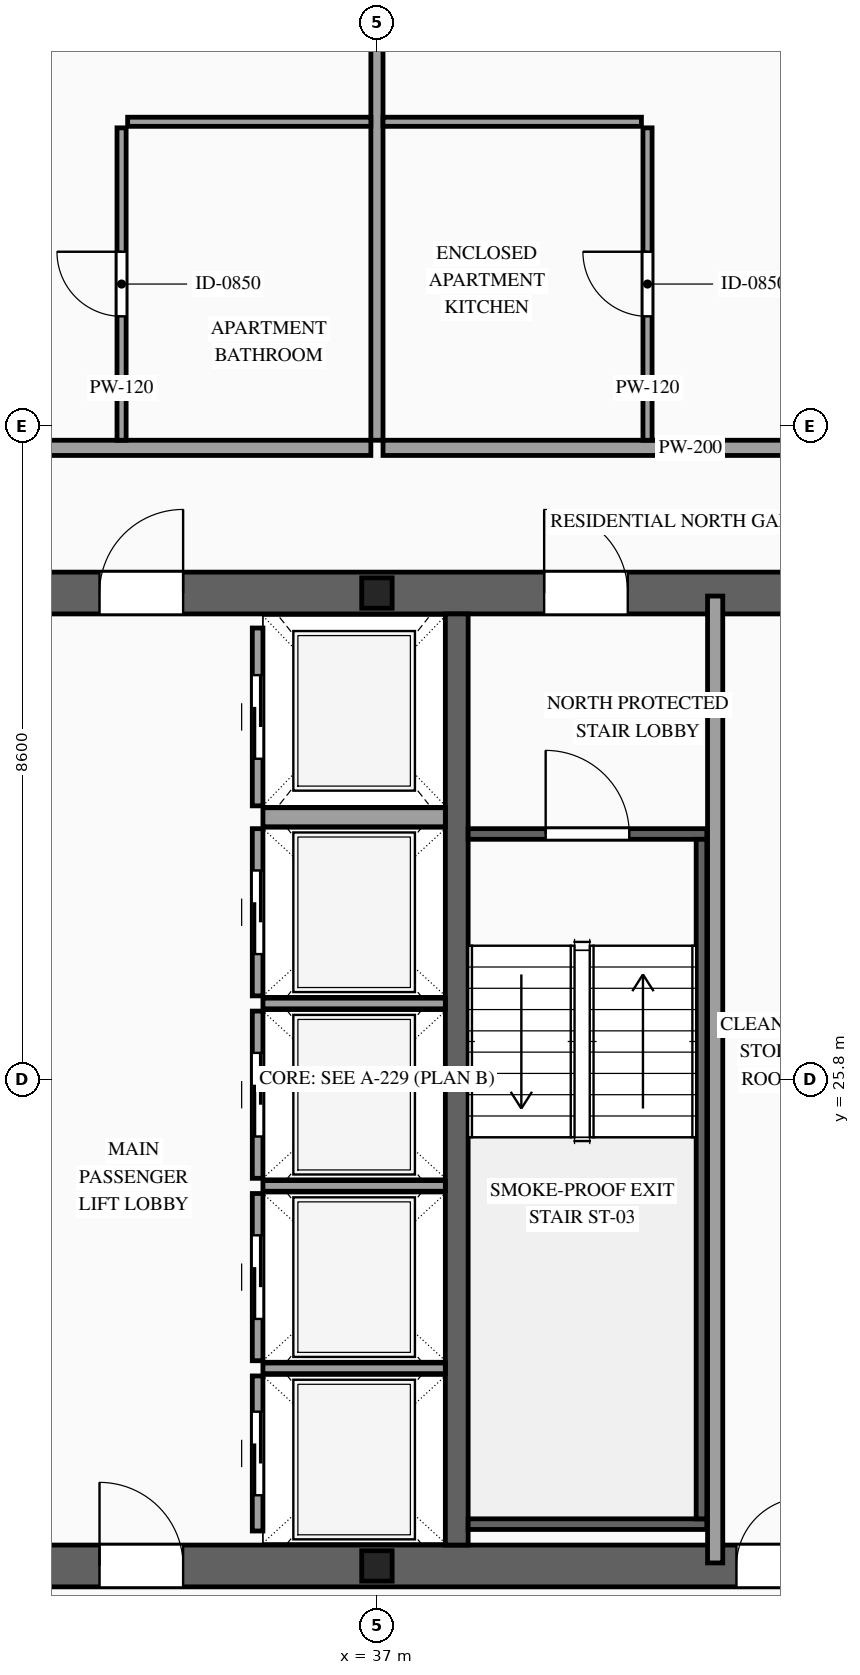
"""IFC4 building model, lengths in metres.
Left out: names, types, materials, properties, quantities, classifications, styles, units other than length and angle.
Written with IfcOpenShell. Run it as: python <this file> out.ifc"""

import sys

from ifc_helpers import new_model, si_unit, direction, frame, frame_2d, origin, origin_2d, place, context, subcontext, project, spatial, rectangle, i_section, extrude, source, transform, mapped, element, fill, save


model = new_model("IFC4")
c1 = context("Model", 3, precision=1e-05, world=origin(), true_north=direction((0.0, 1.0)))
c2 = subcontext(c1, "Body", "Model", "MODEL_VIEW")
j1 = project(units=[si_unit("LENGTHUNIT", "METRE"), si_unit("PLANEANGLEUNIT", "RADIAN")], contexts=[c1])
p1 = place(None, origin())
s1 = spatial("IfcSite", under=j1, at=p1, CompositionType="ELEMENT")
p2 = place(p1, origin())
s2 = spatial("IfcBuilding", under=s1, at=p2, CompositionType="ELEMENT")
p3 = place(p2, frame((0.0, 0.0, 224.1)))
s3 = spatial("IfcBuildingStorey", under=s2, at=p3, CompositionType="ELEMENT", Elevation=224.1)
p4 = place(p3, frame((23.525, 19.4, 0.0), z_axis=(0.0, 0.0, 1.0), x_axis=(1.0, 0.0, 0.0)))
e1 = element("IfcWall", 1, at=p4, inside=s3, PredefinedType="SHEAR", context=c2, shape_type="SweptSolid", body=[
    extrude(rectangle(XDim=26.95, YDim=0.55, at=frame_2d((13.475, 0.0))), origin(), (0.0, 0.0, 1.0), 3.5),
])
p5 = place(p4, frame((1.925, 0.0, 0.0)))
e2 = element("IfcOpeningElement", 2, at=p5, cuts=e1, PredefinedType="OPENING", context=c2, shape_type="SweptSolid", body=[
    extrude(rectangle(XDim=1.1, YDim=2.2, at=frame_2d((0.55, 1.1))), frame((0.0, 0.29, 0.0), z_axis=(0.0, -1.0, 0.0), x_axis=(1.0, 0.0, 0.0)), (0.0, 0.0, 1.0), 0.58),
])
p6 = place(p4, frame((9.825, 0.0, 0.0)))
e3 = element("IfcOpeningElement", 3, at=p6, cuts=e1, PredefinedType="OPENING", context=c2, shape_type="SweptSolid", body=[
    extrude(rectangle(XDim=1.1, YDim=2.2, at=frame_2d((0.55, 1.1))), frame((0.0, 0.29, 0.0), z_axis=(0.0, -1.0, 0.0), x_axis=(1.0, 0.0, 0.0)), (0.0, 0.0, 1.0), 0.58),
])
p7 = place(p4, frame((23.025, 0.0, 0.0)))
e4 = element("IfcOpeningElement", 4, at=p7, cuts=e1, PredefinedType="OPENING", context=c2, shape_type="SweptSolid", body=[
    extrude(rectangle(XDim=1.1, YDim=2.2, at=frame_2d((0.55, 1.1))), frame((0.0, 0.29, 0.0), z_axis=(0.0, -1.0, 0.0), x_axis=(1.0, 0.0, 0.0)), (0.0, 0.0, 1.0), 0.58),
])
p8 = place(p4, frame((19.645, 0.0, 0.0)))
e5 = element("IfcOpeningElement", 5, at=p8, cuts=e1, PredefinedType="OPENING", context=c2, shape_type="SweptSolid", body=[
    extrude(rectangle(XDim=0.9, YDim=2.15, at=frame_2d((0.45, 1.075))), frame((0.0, 0.29, 0.0), z_axis=(0.0, -1.0, 0.0), x_axis=(1.0, 0.0, 0.0)), (0.0, 0.0, 1.0), 0.58),
])
p9 = place(p4, frame((18.205, 0.0, 0.0)))
e6 = element("IfcOpeningElement", 6, at=p9, cuts=e1, PredefinedType="OPENING", context=c2, shape_type="SweptSolid", body=[
    extrude(rectangle(XDim=0.9, YDim=2.15, at=frame_2d((0.45, 1.075))), frame((0.0, 0.29, 0.0), z_axis=(0.0, -1.0, 0.0), x_axis=(1.0, 0.0, 0.0)), (0.0, 0.0, 1.0), 0.58),
])
p10 = place(p3, frame((23.525, 32.2, 0.0), z_axis=(0.0, 0.0, 1.0), x_axis=(1.0, 0.0, 0.0)))
e7 = element("IfcWall", 7, at=p10, inside=s3, PredefinedType="SHEAR", context=c2, shape_type="SweptSolid", body=[
    extrude(rectangle(XDim=26.95, YDim=0.55, at=frame_2d((13.475, 0.0))), origin(), (0.0, 0.0, 1.0), 3.5),
])
p11 = place(p10, frame((4.545, 0.0, 0.0)))
e8 = element("IfcOpeningElement", 8, at=p11, cuts=e7, PredefinedType="OPENING", context=c2, shape_type="SweptSolid", body=[
    extrude(rectangle(XDim=0.9, YDim=2.15, at=frame_2d((0.45, 1.075))), frame((0.0, 0.29, 0.0), z_axis=(0.0, -1.0, 0.0), x_axis=(1.0, 0.0, 0.0)), (0.0, 0.0, 1.0), 0.58),
])
p12 = place(p10, frame((9.825, 0.0, 0.0)))
e9 = element("IfcOpeningElement", 9, at=p12, cuts=e7, PredefinedType="OPENING", context=c2, shape_type="SweptSolid", body=[
    extrude(rectangle(XDim=1.1, YDim=2.2, at=frame_2d((0.55, 1.1))), frame((0.0, 0.29, 0.0), z_axis=(0.0, -1.0, 0.0), x_axis=(1.0, 0.0, 0.0)), (0.0, 0.0, 1.0), 0.58),
])
p13 = place(p10, frame((15.675, 0.0, 0.0)))
e10 = element("IfcOpeningElement", 10, at=p13, cuts=e7, PredefinedType="OPENING", context=c2, shape_type="SweptSolid", body=[
    extrude(rectangle(XDim=1.1, YDim=2.2, at=frame_2d((0.55, 1.1))), frame((0.0, 0.29, 0.0), z_axis=(0.0, -1.0, 0.0), x_axis=(1.0, 0.0, 0.0)), (0.0, 0.0, 1.0), 0.58),
])
p14 = place(p10, frame((19.645, 0.0, 0.0)))
e11 = element("IfcOpeningElement", 11, at=p14, cuts=e7, PredefinedType="OPENING", context=c2, shape_type="SweptSolid", body=[
    extrude(rectangle(XDim=0.9, YDim=2.15, at=frame_2d((0.45, 1.075))), frame((0.0, 0.29, 0.0), z_axis=(0.0, -1.0, 0.0), x_axis=(1.0, 0.0, 0.0)), (0.0, 0.0, 1.0), 0.58),
])
m1 = source(origin(), c2, "Body", "SweptSolid", [
    extrude(rectangle(XDim=12.25, YDim=0.3, at=frame_2d((6.125, 0.0))), origin(), (0.0, 0.0, 1.0), 3.5),
])
p15 = place(p3, frame((38.05, 19.675, 0.0), z_axis=(0.0, 0.0, 1.0), x_axis=(0.0, 1.0, 0.0)))
e12 = element("IfcWall", 12, at=p15, inside=s3, PredefinedType="SOLIDWALL", context=c2, shape_type="MappedRepresentation", body=[
    mapped(m1, transform((0.0, 0.0, 0.0), scale=1.0)),
])
m2 = source(origin(), c2, "Body", "SweptSolid", [
    extrude(i_section(OverallWidth=0.4, OverallDepth=0.4, WebThickness=0.013, FlangeThickness=0.021, at=origin_2d()), origin(), (0.0, 0.0, 1.0), 3.5),
])
for number, where, z_axis, x_axis in (
    (13, (37.0, 19.4, 0.0), (0.0, 0.0, 1.0), (1.0, 0.0, 0.0)),
    (14, (37.0, 32.2, 0.0), (0.0, 0.0, 1.0), (1.0, 0.0, 0.0)),
):
    element("IfcColumn", number, at=place(p3, frame(where, z_axis=z_axis, x_axis=x_axis)), inside=s3, PredefinedType="COLUMN", context=c2, shape_type="MappedRepresentation", body=[
        mapped(m2, transform((0.0, 0.0, 0.0), scale=1.0)),
    ])
p16 = place(p3, frame((35.43, 19.86, 0.0), z_axis=(0.0, 0.0, 1.0), x_axis=(0.0, 1.0, 0.0)))
e15 = element("IfcWall", 15, at=p16, inside=s3, PredefinedType="SOLIDWALL", context=c2, shape_type="SweptSolid", body=[
    extrude(rectangle(XDim=2.04, YDim=0.14, at=frame_2d((1.02, 0.0))), origin(), (0.0, 0.0, 1.0), 3.28),
])
p17 = place(p16, frame((0.47, 0.0, 0.0)))
e16 = element("IfcOpeningElement", 16, at=p17, cuts=e15, PredefinedType="OPENING", context=c2, shape_type="SweptSolid", body=[
    extrude(rectangle(XDim=1.1, YDim=2.2, at=frame_2d((0.55, 1.1))), frame((0.0, 0.085, 0.0), z_axis=(0.0, -1.0, 0.0), x_axis=(1.0, 0.0, 0.0)), (0.0, 0.0, 1.0), 0.17),
])
m3 = source(origin(), c2, "Body", "SweptSolid", [
    extrude(rectangle(XDim=2.4, YDim=0.14, at=frame_2d((1.2, 0.0))), origin(), (0.0, 0.0, 1.0), 3.28),
])
p18 = place(p3, frame((35.5, 22.0, 0.0), z_axis=(0.0, 0.0, 1.0), x_axis=(1.0, 0.0, 0.0)))
e17 = element("IfcWall", 17, at=p18, inside=s3, PredefinedType="SOLIDWALL", context=c2, shape_type="MappedRepresentation", body=[
    mapped(m3, transform((0.0, 0.0, 0.0), scale=1.0)),
])
p19 = place(p3, frame((35.43, 22.1, 0.0), z_axis=(0.0, 0.0, 1.0), x_axis=(0.0, 1.0, 0.0)))
e18 = element("IfcWall", 18, at=p19, inside=s3, PredefinedType="SOLIDWALL", context=c2, shape_type="SweptSolid", body=[
    extrude(rectangle(XDim=2.2, YDim=0.14, at=frame_2d((1.1, 0.0))), origin(), (0.0, 0.0, 1.0), 3.28),
])
p20 = place(p19, frame((0.55, 0.0, 0.0)))
e19 = element("IfcOpeningElement", 19, at=p20, cuts=e18, PredefinedType="OPENING", context=c2, shape_type="SweptSolid", body=[
    extrude(rectangle(XDim=1.1, YDim=2.2, at=frame_2d((0.55, 1.1))), frame((0.0, 0.085, 0.0), z_axis=(0.0, -1.0, 0.0), x_axis=(1.0, 0.0, 0.0)), (0.0, 0.0, 1.0), 0.17),
])
p21 = place(p3, frame((35.5, 24.4, 0.0), z_axis=(0.0, 0.0, 1.0), x_axis=(1.0, 0.0, 0.0)))
e20 = element("IfcWall", 20, at=p21, inside=s3, PredefinedType="SOLIDWALL", context=c2, shape_type="MappedRepresentation", body=[
    mapped(m3, transform((0.0, 0.0, 0.0), scale=1.0)),
])
p22 = place(p3, frame((35.43, 24.5, 0.0), z_axis=(0.0, 0.0, 1.0), x_axis=(0.0, 1.0, 0.0)))
e21 = element("IfcWall", 21, at=p22, inside=s3, PredefinedType="SOLIDWALL", context=c2, shape_type="SweptSolid", body=[
    extrude(rectangle(XDim=2.2, YDim=0.14, at=frame_2d((1.1, 0.0))), origin(), (0.0, 0.0, 1.0), 3.28),
])
p23 = place(p22, frame((0.55, 0.0, 0.0)))
e22 = element("IfcOpeningElement", 22, at=p23, cuts=e21, PredefinedType="OPENING", context=c2, shape_type="SweptSolid", body=[
    extrude(rectangle(XDim=1.1, YDim=2.2, at=frame_2d((0.55, 1.1))), frame((0.0, 0.085, 0.0), z_axis=(0.0, -1.0, 0.0), x_axis=(1.0, 0.0, 0.0)), (0.0, 0.0, 1.0), 0.17),
])
p24 = place(p3, frame((35.5, 26.8, 0.0), z_axis=(0.0, 0.0, 1.0), x_axis=(1.0, 0.0, 0.0)))
e23 = element("IfcWall", 23, at=p24, inside=s3, PredefinedType="SOLIDWALL", context=c2, shape_type="MappedRepresentation", body=[
    mapped(m3, transform((0.0, 0.0, 0.0), scale=1.0)),
])
p25 = place(p3, frame((35.43, 26.9, 0.0), z_axis=(0.0, 0.0, 1.0), x_axis=(0.0, 1.0, 0.0)))
e24 = element("IfcWall", 24, at=p25, inside=s3, PredefinedType="SOLIDWALL", context=c2, shape_type="SweptSolid", body=[
    extrude(rectangle(XDim=2.2, YDim=0.14, at=frame_2d((1.1, 0.0))), origin(), (0.0, 0.0, 1.0), 3.28),
])
p26 = place(p25, frame((0.55, 0.0, 0.0)))
e25 = element("IfcOpeningElement", 25, at=p26, cuts=e24, PredefinedType="OPENING", context=c2, shape_type="SweptSolid", body=[
    extrude(rectangle(XDim=1.1, YDim=2.2, at=frame_2d((0.55, 1.1))), frame((0.0, 0.085, 0.0), z_axis=(0.0, -1.0, 0.0), x_axis=(1.0, 0.0, 0.0)), (0.0, 0.0, 1.0), 0.17),
])
p27 = place(p3, frame((35.43, 29.4, 0.0), z_axis=(0.0, 0.0, 1.0), x_axis=(0.0, 1.0, 0.0)))
e26 = element("IfcWall", 26, at=p27, inside=s3, PredefinedType="SOLIDWALL", context=c2, shape_type="SweptSolid", body=[
    extrude(rectangle(XDim=2.34, YDim=0.14, at=frame_2d((1.17, 0.0))), origin(), (0.0, 0.0, 1.0), 3.28),
])
p28 = place(p27, frame((0.62, 0.0, 0.0)))
e27 = element("IfcOpeningElement", 27, at=p28, cuts=e26, PredefinedType="OPENING", context=c2, shape_type="SweptSolid", body=[
    extrude(rectangle(XDim=1.1, YDim=2.2, at=frame_2d((0.55, 1.1))), frame((0.0, 0.085, 0.0), z_axis=(0.0, -1.0, 0.0), x_axis=(1.0, 0.0, 0.0)), (0.0, 0.0, 1.0), 0.17),
])
m4 = source(origin(), c2, "Body", "SweptSolid", [
    extrude(rectangle(XDim=2.4, YDim=0.25, at=frame_2d((1.2, 0.0))), origin(), (0.0, 0.0, 1.0), 3.28),
])
p29 = place(p3, frame((35.5, 29.25, 0.0), z_axis=(0.0, 0.0, 1.0), x_axis=(1.0, 0.0, 0.0)))
e28 = element("IfcWall", 28, at=p29, inside=s3, PredefinedType="SOLIDWALL", context=c2, shape_type="MappedRepresentation", body=[
    mapped(m4, transform((0.0, 0.0, 0.0), scale=1.0)),
])
p30 = place(p3, frame((38.2, 29.03, 0.0), z_axis=(0.0, 0.0, 1.0), x_axis=(1.0, 0.0, 0.0)))
e29 = element("IfcWall", 29, at=p30, inside=s3, PredefinedType="SOLIDWALL", context=c2, shape_type="SweptSolid", body=[
    extrude(rectangle(XDim=3.14, YDim=0.14, at=frame_2d((1.57, 0.0))), origin(), (0.0, 0.0, 1.0), 3.28),
])
p31 = place(p30, frame((1.02, 0.0, 0.0)))
e30 = element("IfcOpeningElement", 30, at=p31, cuts=e29, PredefinedType="OPENING", context=c2, shape_type="SweptSolid", body=[
    extrude(rectangle(XDim=1.1, YDim=2.2, at=frame_2d((0.55, 1.1))), frame((0.0, 0.085, 0.0), z_axis=(0.0, -1.0, 0.0), x_axis=(1.0, 0.0, 0.0)), (0.0, 0.0, 1.0), 0.17),
])
m5 = source(origin(), c2, "Body", "SweptSolid", [
    extrude(rectangle(XDim=3.14, YDim=0.14, at=frame_2d((1.57, 0.0))), origin(), (0.0, 0.0, 1.0), 3.28),
])
p32 = place(p3, frame((38.2, 19.95, 0.0), z_axis=(0.0, 0.0, 1.0), x_axis=(1.0, 0.0, 0.0)))
e31 = element("IfcWall", 31, at=p32, inside=s3, PredefinedType="SOLIDWALL", context=c2, shape_type="MappedRepresentation", body=[
    mapped(m5, transform((0.0, 0.0, 0.0), scale=1.0)),
])
m6 = source(origin(), c2, "Body", "SweptSolid", [
    extrude(rectangle(XDim=8.94, YDim=0.14, at=frame_2d((4.47, 0.0))), origin(), (0.0, 0.0, 1.0), 3.28),
])
p33 = place(p3, frame((41.27, 20.02, 0.0), z_axis=(0.0, 0.0, 1.0), x_axis=(0.0, 1.0, 0.0)))
e32 = element("IfcWall", 32, at=p33, inside=s3, PredefinedType="SOLIDWALL", context=c2, shape_type="MappedRepresentation", body=[
    mapped(m6, transform((0.0, 0.0, 0.0), scale=1.0)),
])
m7 = source(origin(), c2, "Body", "SweptSolid", [
    extrude(rectangle(XDim=12.72, YDim=0.2, at=frame_2d((6.36, 0.0))), origin(), (0.0, 0.0, 1.0), 3.28),
])
p34 = place(p3, frame((41.45, 19.44, 0.0), z_axis=(0.0, 0.0, 1.0), x_axis=(0.0, 1.0, 0.0)))
e33 = element("IfcWall", 33, at=p34, inside=s3, PredefinedType="PARTITIONING", context=c2, shape_type="MappedRepresentation", body=[
    mapped(m7, transform((0.0, 0.0, 0.0), scale=1.0)),
])
p35 = place(p3, frame((19.44, 34.11, 0.0), z_axis=(0.0, 0.0, 1.0), x_axis=(1.0, 0.0, 0.0)))
e34 = element("IfcWall", 34, at=p35, inside=s3, PredefinedType="PARTITIONING", context=c2, shape_type="SweptSolid", body=[
    extrude(rectangle(XDim=17.48, YDim=0.2, at=frame_2d((8.74, 0.0))), origin(), (0.0, 0.0, 1.0), 3.28),
])
p36 = place(p35, frame((8.34, 0.0, 0.0)))
e35 = element("IfcOpeningElement", 35, at=p36, cuts=e34, PredefinedType="OPENING", context=c2, shape_type="SweptSolid", body=[
    extrude(rectangle(XDim=1.0, YDim=2.2, at=frame_2d((0.5, 1.1))), frame((0.0, 0.115, 0.0), z_axis=(0.0, -1.0, 0.0), x_axis=(1.0, 0.0, 0.0)), (0.0, 0.0, 1.0), 0.23),
])
m8 = source(origin(), c2, "Body", "SweptSolid", [
    extrude(rectangle(XDim=12.04, YDim=0.16, at=frame_2d((6.02, 0.0))), origin(), (0.0, 0.0, 1.0), 2.787),
])
p37 = place(p3, frame((37.0, 34.21, 0.0), z_axis=(0.0, 0.0, 1.0), x_axis=(0.0, 1.0, 0.0)))
e36 = element("IfcWall", 36, at=p37, inside=s3, PredefinedType="PARTITIONING", context=c2, shape_type="MappedRepresentation", body=[
    mapped(m8, transform((0.0, 0.0, 0.0), scale=1.0)),
])
m9 = source(origin(), c2, "Body", "SweptSolid", [
    extrude(rectangle(XDim=3.2, YDim=0.12, at=frame_2d((1.6, 0.0))), origin(), (0.0, 0.0, 1.0), 3.28),
])
p38 = place(p3, frame((33.72, 38.4, 0.0), z_axis=(0.0, 0.0, 1.0), x_axis=(1.0, 0.0, 0.0)))
e37 = element("IfcWall", 37, at=p38, inside=s3, PredefinedType="PARTITIONING", context=c2, shape_type="MappedRepresentation", body=[
    mapped(m9, transform((0.0, 0.0, 0.0), scale=1.0)),
])
p39 = place(p3, frame((33.64, 34.21, 0.0), z_axis=(0.0, 0.0, 1.0), x_axis=(0.0, 1.0, 0.0)))
e38 = element("IfcWall", 38, at=p39, inside=s3, PredefinedType="PARTITIONING", context=c2, shape_type="SweptSolid", body=[
    extrude(rectangle(XDim=4.11, YDim=0.12, at=frame_2d((2.055, 0.0))), origin(), (0.0, 0.0, 1.0), 3.28),
])
p40 = place(p39, frame((1.63, 0.0, 0.0)))
e39 = element("IfcOpeningElement", 39, at=p40, cuts=e38, PredefinedType="OPENING", context=c2, shape_type="SweptSolid", body=[
    extrude(rectangle(XDim=0.85, YDim=2.1, at=frame_2d((0.425, 1.05))), frame((0.0, 0.075, 0.0), z_axis=(0.0, -1.0, 0.0), x_axis=(1.0, 0.0, 0.0)), (0.0, 0.0, 1.0), 0.15),
])
p41 = place(p3, frame((37.08, 34.11, 0.0), z_axis=(0.0, 0.0, 1.0), x_axis=(1.0, 0.0, 0.0)))
e40 = element("IfcWall", 40, at=p41, inside=s3, PredefinedType="PARTITIONING", context=c2, shape_type="SweptSolid", body=[
    extrude(rectangle(XDim=17.48, YDim=0.2, at=frame_2d((8.74, 0.0))), origin(), (0.0, 0.0, 1.0), 3.28),
])
p42 = place(p41, frame((8.34, 0.0, 0.0)))
e41 = element("IfcOpeningElement", 41, at=p42, cuts=e40, PredefinedType="OPENING", context=c2, shape_type="SweptSolid", body=[
    extrude(rectangle(XDim=1.0, YDim=2.2, at=frame_2d((0.5, 1.1))), frame((0.0, 0.115, 0.0), z_axis=(0.0, -1.0, 0.0), x_axis=(1.0, 0.0, 0.0)), (0.0, 0.0, 1.0), 0.23),
])
m10 = source(origin(), c2, "Body", "SweptSolid", [
    extrude(rectangle(XDim=3.4, YDim=0.12, at=frame_2d((1.7, 0.0))), origin(), (0.0, 0.0, 1.0), 3.28),
])
p43 = place(p3, frame((37.08, 38.4, 0.0), z_axis=(0.0, 0.0, 1.0), x_axis=(1.0, 0.0, 0.0)))
e42 = element("IfcWall", 42, at=p43, inside=s3, PredefinedType="PARTITIONING", context=c2, shape_type="MappedRepresentation", body=[
    mapped(m10, transform((0.0, 0.0, 0.0), scale=1.0)),
])
p44 = place(p3, frame((40.56, 34.21, 0.0), z_axis=(0.0, 0.0, 1.0), x_axis=(0.0, 1.0, 0.0)))
e43 = element("IfcWall", 43, at=p44, inside=s3, PredefinedType="PARTITIONING", context=c2, shape_type="SweptSolid", body=[
    extrude(rectangle(XDim=4.11, YDim=0.12, at=frame_2d((2.055, 0.0))), origin(), (0.0, 0.0, 1.0), 3.28),
])
p45 = place(p44, frame((1.63, 0.0, 0.0)))
e44 = element("IfcOpeningElement", 44, at=p45, cuts=e43, PredefinedType="OPENING", context=c2, shape_type="SweptSolid", body=[
    extrude(rectangle(XDim=0.85, YDim=2.1, at=frame_2d((0.425, 1.05))), frame((0.0, 0.075, 0.0), z_axis=(0.0, -1.0, 0.0), x_axis=(1.0, 0.0, 0.0)), (0.0, 0.0, 1.0), 0.15),
])
m11 = source(origin(), c2, "Body", "SweptSolid", [
    extrude(rectangle(XDim=1.1, YDim=2.2, at=frame_2d((0.55, 1.1))), frame((0.0, 0.025, 0.0), z_axis=(0.0, -1.0, 0.0), x_axis=(1.0, 0.0, 0.0)), (0.0, 0.0, 1.0), 0.05),
])
p46 = place(p17, origin())
e45 = element("IfcDoor", 45, at=p46, inside=s3, OperationType="SLIDING_TO_RIGHT", PredefinedType="DOOR", context=c2, shape_type="MappedRepresentation", body=[
    mapped(m11, transform((0.0, 0.0, 0.0), scale=1.0)),
])
fill(e16, e45)
p47 = place(p20, origin())
e46 = element("IfcDoor", 46, at=p47, inside=s3, OperationType="SLIDING_TO_LEFT", PredefinedType="DOOR", context=c2, shape_type="MappedRepresentation", body=[
    mapped(m11, transform((0.0, 0.0, 0.0), scale=1.0)),
])
fill(e19, e46)
p48 = place(p23, origin())
e47 = element("IfcDoor", 47, at=p48, inside=s3, OperationType="SLIDING_TO_RIGHT", PredefinedType="DOOR", context=c2, shape_type="MappedRepresentation", body=[
    mapped(m11, transform((0.0, 0.0, 0.0), scale=1.0)),
])
fill(e22, e47)
p49 = place(p26, origin())
e48 = element("IfcDoor", 48, at=p49, inside=s3, OperationType="SLIDING_TO_LEFT", PredefinedType="DOOR", context=c2, shape_type="MappedRepresentation", body=[
    mapped(m11, transform((0.0, 0.0, 0.0), scale=1.0)),
])
fill(e25, e48)
p50 = place(p28, origin())
e49 = element("IfcDoor", 49, at=p50, inside=s3, OperationType="SLIDING_TO_RIGHT", PredefinedType="DOOR", context=c2, shape_type="MappedRepresentation", body=[
    mapped(m11, transform((0.0, 0.0, 0.0), scale=1.0)),
])
fill(e27, e49)
m12 = source(origin(), c2, "Body", "SweptSolid", [
    extrude(rectangle(XDim=1.1, YDim=2.2, at=frame_2d((0.55, 1.1))), frame((0.0, 0.025, 0.0), z_axis=(0.0, -1.0, 0.0), x_axis=(1.0, 0.0, 0.0)), (0.0, 0.0, 1.0), 0.05),
])
p51 = place(p31, origin())
e50 = element("IfcDoor", 50, at=p51, inside=s3, OperationType="SINGLE_SWING_LEFT", PredefinedType="DOOR", context=c2, shape_type="MappedRepresentation", body=[
    mapped(m12, transform((0.0, 0.0, 0.0), scale=1.0)),
])
fill(e30, e50)
p52 = place(p6, origin())
e51 = element("IfcDoor", 51, at=p52, inside=s3, OperationType="SINGLE_SWING_LEFT", PredefinedType="DOOR", context=c2, shape_type="MappedRepresentation", body=[
    mapped(m12, transform((0.0, 0.0, 0.0), scale=1.0)),
])
fill(e3, e51)
p53 = place(p12, origin())
e52 = element("IfcDoor", 52, at=p53, inside=s3, OperationType="SINGLE_SWING_RIGHT", PredefinedType="DOOR", context=c2, shape_type="MappedRepresentation", body=[
    mapped(m12, transform((0.0, 0.0, 0.0), scale=1.0)),
])
fill(e9, e52)
p54 = place(p13, origin())
e53 = element("IfcDoor", 53, at=p54, inside=s3, OperationType="SINGLE_SWING_LEFT", PredefinedType="DOOR", context=c2, shape_type="MappedRepresentation", body=[
    mapped(m12, transform((0.0, 0.0, 0.0), scale=1.0)),
])
fill(e10, e53)
m13 = source(origin(), c2, "Body", "SweptSolid", [
    extrude(rectangle(XDim=0.9, YDim=2.15, at=frame_2d((0.45, 1.075))), frame((0.0, 0.025, 0.0), z_axis=(0.0, -1.0, 0.0), x_axis=(1.0, 0.0, 0.0)), (0.0, 0.0, 1.0), 0.05),
])
p55 = place(p9, origin())
e54 = element("IfcDoor", 54, at=p55, inside=s3, OperationType="SINGLE_SWING_RIGHT", PredefinedType="DOOR", context=c2, shape_type="MappedRepresentation", body=[
    mapped(m13, transform((0.0, 0.0, 0.0), scale=1.0)),
])
fill(e6, e54)
m14 = source(origin(), c2, "Body", "SweptSolid", [
    extrude(rectangle(XDim=0.85, YDim=2.1, at=frame_2d((0.425, 1.05))), frame((0.0, 0.025, 0.0), z_axis=(0.0, -1.0, 0.0), x_axis=(1.0, 0.0, 0.0)), (0.0, 0.0, 1.0), 0.05),
])
p56 = place(p40, origin())
e55 = element("IfcDoor", 55, at=p56, inside=s3, OperationType="SINGLE_SWING_RIGHT", PredefinedType="DOOR", context=c2, shape_type="MappedRepresentation", body=[
    mapped(m14, transform((0.0, 0.0, 0.0), scale=1.0)),
])
fill(e39, e55)
p57 = place(p45, origin())
e56 = element("IfcDoor", 56, at=p57, inside=s3, OperationType="SINGLE_SWING_RIGHT", PredefinedType="DOOR", context=c2, shape_type="MappedRepresentation", body=[
    mapped(m14, transform((0.0, 0.0, 0.0), scale=1.0)),
])
fill(e44, e56)
save(model, sys.argv[1])
